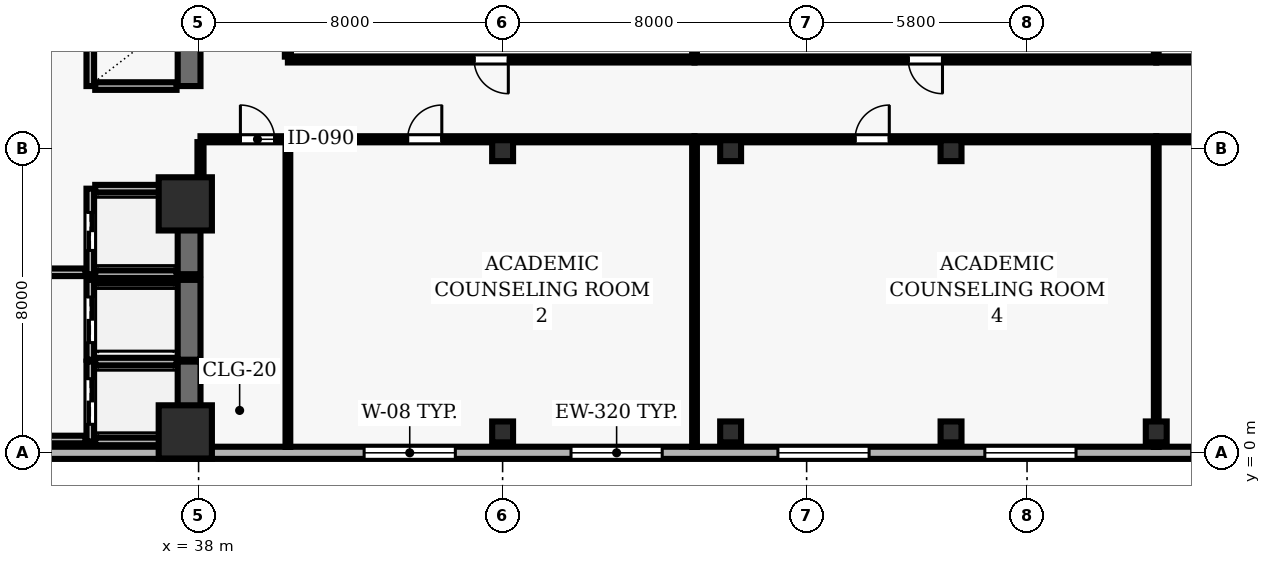
"""IFC4 building model, lengths in metres.
Left out: names, types, materials, properties, quantities, classifications, styles, units other than length and angle.
Written with IfcOpenShell. Run it as: python <this file> out.ifc"""

import sys

from ifc_helpers import new_model, si_unit, direction, frame, frame_2d, origin, origin_2d, place, context, subcontext, project, spatial, rectangle, hollow_rectangle, extrude, element, fill, save


model = new_model("IFC4")
c1 = context("Model", 3, precision=1e-05, world=origin(), true_north=direction((0.0, 1.0)))
c2 = subcontext(c1, "Body", "Model", "MODEL_VIEW")
j1 = project(units=[si_unit("LENGTHUNIT", "METRE"), si_unit("PLANEANGLEUNIT", "RADIAN")], contexts=[c1])
p1 = place(None, origin())
s1 = spatial("IfcSite", under=j1, at=p1, CompositionType="ELEMENT")
p2 = place(p1, origin())
s2 = spatial("IfcBuilding", under=s1, at=p2, CompositionType="ELEMENT")
p3 = place(p2, frame((0.0, 0.0, 81.7)))
s3 = spatial("IfcBuildingStorey", under=s2, at=p3, CompositionType="ELEMENT", Elevation=81.7)
for number, where, z_axis, x_axis in (
    (1, (37.65, 0.55, 0.0), (0.0, 0.0, 1.0), (1.0, 0.0, 0.0)),
    (2, (37.65, 6.55, 0.0), (0.0, 0.0, 1.0), (1.0, 0.0, 0.0)),
):
    element("IfcColumn", number, at=place(p3, frame(where, z_axis=z_axis, x_axis=x_axis)), inside=s3, PredefinedType="COLUMN", context=c2, shape_type="SweptSolid", body=[
        extrude(rectangle(XDim=1.4, YDim=1.4, at=origin_2d()), origin(), (0.0, 0.0, 1.0), 3.9),
    ])
for number, where, z_axis, x_axis in (
    (3, (46.0, 0.55, 0.0), (0.0, 0.0, 1.0), (1.0, 0.0, 0.0)),
    (4, (46.0, 7.95, 0.0), (0.0, 0.0, 1.0), (1.0, 0.0, 0.0)),
    (5, (52.0, 0.55, 0.0), (0.0, 0.0, 1.0), (1.0, 0.0, 0.0)),
    (6, (52.0, 7.95, 0.0), (0.0, 0.0, 1.0), (1.0, 0.0, 0.0)),
    (7, (57.8, 0.55, 0.0), (0.0, 0.0, 1.0), (1.0, 0.0, 0.0)),
    (8, (57.8, 7.95, 0.0), (0.0, 0.0, 1.0), (1.0, 0.0, 0.0)),
    (9, (63.2, 0.55, 0.0), (0.0, 0.0, 1.0), (1.0, 0.0, 0.0)),
):
    element("IfcColumn", number, at=place(p3, frame(where, z_axis=z_axis, x_axis=x_axis)), inside=s3, PredefinedType="COLUMN", context=c2, shape_type="SweptSolid", body=[
        extrude(hollow_rectangle(XDim=0.55, YDim=0.55, WallThickness=0.025, at=origin_2d()), origin(), (0.0, 0.0, 1.0), 3.9),
    ])
p4 = place(p3, frame((24.5, 0.0, 0.0), z_axis=(0.0, 0.0, 1.0), x_axis=(1.0, 0.0, 0.0)))
e10 = element("IfcWall", 10, at=p4, inside=s3, PredefinedType="SOLIDWALL", context=c2, shape_type="SweptSolid", body=[
    extrude(rectangle(XDim=49.0, YDim=0.32, at=frame_2d((24.5, 0.0))), origin(), (0.0, 0.0, 1.0), 3.69),
])
p5 = place(p4, frame((1.522, 0.0, 0.9)))
e11 = element("IfcOpeningElement", 11, at=p5, cuts=e10, PredefinedType="OPENING", context=c2, shape_type="SweptSolid", body=[
    extrude(rectangle(XDim=2.4, YDim=1.8, at=frame_2d((1.2, 0.9))), frame((0.0, 0.17, 0.0), z_axis=(0.0, -1.0, 0.0), x_axis=(1.0, 0.0, 0.0)), (0.0, 0.0, 1.0), 0.34),
])
p6 = place(p4, frame((17.856, 0.0, 0.9)))
e12 = element("IfcOpeningElement", 12, at=p6, cuts=e10, PredefinedType="OPENING", context=c2, shape_type="SweptSolid", body=[
    extrude(rectangle(XDim=2.4, YDim=1.8, at=frame_2d((1.2, 0.9))), frame((0.0, 0.17, 0.0), z_axis=(0.0, -1.0, 0.0), x_axis=(1.0, 0.0, 0.0)), (0.0, 0.0, 1.0), 0.34),
])
p7 = place(p4, frame((23.3, 0.0, 0.9)))
e13 = element("IfcOpeningElement", 13, at=p7, cuts=e10, PredefinedType="OPENING", context=c2, shape_type="SweptSolid", body=[
    extrude(rectangle(XDim=2.4, YDim=1.8, at=frame_2d((1.2, 0.9))), frame((0.0, 0.17, 0.0), z_axis=(0.0, -1.0, 0.0), x_axis=(1.0, 0.0, 0.0)), (0.0, 0.0, 1.0), 0.34),
])
p8 = place(p4, frame((28.744, 0.0, 0.9)))
e14 = element("IfcOpeningElement", 14, at=p8, cuts=e10, PredefinedType="OPENING", context=c2, shape_type="SweptSolid", body=[
    extrude(rectangle(XDim=2.4, YDim=1.8, at=frame_2d((1.2, 0.9))), frame((0.0, 0.17, 0.0), z_axis=(0.0, -1.0, 0.0), x_axis=(1.0, 0.0, 0.0)), (0.0, 0.0, 1.0), 0.34),
])
p9 = place(p4, frame((34.189, 0.0, 0.9)))
e15 = element("IfcOpeningElement", 15, at=p9, cuts=e10, PredefinedType="OPENING", context=c2, shape_type="SweptSolid", body=[
    extrude(rectangle(XDim=2.4, YDim=1.8, at=frame_2d((1.2, 0.9))), frame((0.0, 0.17, 0.0), z_axis=(0.0, -1.0, 0.0), x_axis=(1.0, 0.0, 0.0)), (0.0, 0.0, 1.0), 0.34),
])
p10 = place(p4, frame((39.633, 0.0, 0.9)))
e16 = element("IfcOpeningElement", 16, at=p10, cuts=e10, PredefinedType="OPENING", context=c2, shape_type="SweptSolid", body=[
    extrude(rectangle(XDim=2.4, YDim=1.8, at=frame_2d((1.2, 0.9))), frame((0.0, 0.17, 0.0), z_axis=(0.0, -1.0, 0.0), x_axis=(1.0, 0.0, 0.0)), (0.0, 0.0, 1.0), 0.34),
])
p11 = place(p4, frame((45.078, 0.0, 0.9)))
e17 = element("IfcOpeningElement", 17, at=p11, cuts=e10, PredefinedType="OPENING", context=c2, shape_type="SweptSolid", body=[
    extrude(rectangle(XDim=2.4, YDim=1.8, at=frame_2d((1.2, 0.9))), frame((0.0, 0.17, 0.0), z_axis=(0.0, -1.0, 0.0), x_axis=(1.0, 0.0, 0.0)), (0.0, 0.0, 1.0), 0.34),
])
p12 = place(p3, frame((35.15, 2.4, 0.0), z_axis=(0.0, 0.0, 1.0), x_axis=(0.0, -1.0, 0.0)))
e18 = element("IfcWall", 18, at=p12, inside=s3, PredefinedType="SOLIDWALL", context=c2, shape_type="SweptSolid", body=[
    extrude(rectangle(XDim=2.1, YDim=0.2, at=frame_2d((1.05, 0.0))), origin(), (0.0, 0.0, 1.0), 3.69),
])
p13 = place(p12, frame((0.45, 0.0, 0.0)))
e19 = element("IfcOpeningElement", 19, at=p13, cuts=e18, PredefinedType="OPENING", context=c2, shape_type="SweptSolid", body=[
    extrude(rectangle(XDim=1.2, YDim=2.15, at=frame_2d((0.6, 1.075))), frame((0.0, 0.11, 0.0), z_axis=(0.0, -1.0, 0.0), x_axis=(1.0, 0.0, 0.0)), (0.0, 0.0, 1.0), 0.22),
])
p14 = place(p3, frame((37.75, 0.3, 0.0), z_axis=(0.0, 0.0, 1.0), x_axis=(0.0, 1.0, 0.0)))
e20 = element("IfcWall", 20, at=p14, inside=s3, PredefinedType="SHEAR", context=c2, shape_type="SweptSolid", body=[
    extrude(rectangle(XDim=2.1, YDim=0.6, at=frame_2d((1.05, 0.0))), origin(), (0.0, 0.0, 1.0), 3.69),
])
for number, where, z_axis, x_axis in (
    (21, (35.28, 0.3, 0.0), (0.0, 0.0, 1.0), (1.0, 0.0, 0.0)),
    (22, (37.42, 2.4, 0.0), (0.0, 0.0, 1.0), (-1.0, 0.0, 0.0)),
):
    element("IfcWall", number, at=place(p3, frame(where, z_axis=z_axis, x_axis=x_axis)), inside=s3, PredefinedType="SOLIDWALL", context=c2, shape_type="SweptSolid", body=[
        extrude(rectangle(XDim=2.14, YDim=0.2, at=frame_2d((1.07, 0.0))), origin(), (0.0, 0.0, 1.0), 3.69),
    ])
p15 = place(p3, frame((35.15, 4.55, 0.0), z_axis=(0.0, 0.0, 1.0), x_axis=(0.0, -1.0, 0.0)))
e23 = element("IfcWall", 23, at=p15, inside=s3, PredefinedType="SOLIDWALL", context=c2, shape_type="SweptSolid", body=[
    extrude(rectangle(XDim=2.1, YDim=0.2, at=frame_2d((1.05, 0.0))), origin(), (0.0, 0.0, 1.0), 3.69),
])
p16 = place(p15, frame((0.45, 0.0, 0.0)))
e24 = element("IfcOpeningElement", 24, at=p16, cuts=e23, PredefinedType="OPENING", context=c2, shape_type="SweptSolid", body=[
    extrude(rectangle(XDim=1.2, YDim=2.15, at=frame_2d((0.6, 1.075))), frame((0.0, 0.11, 0.0), z_axis=(0.0, -1.0, 0.0), x_axis=(1.0, 0.0, 0.0)), (0.0, 0.0, 1.0), 0.22),
])
p17 = place(p3, frame((37.75, 2.45, 0.0), z_axis=(0.0, 0.0, 1.0), x_axis=(0.0, 1.0, 0.0)))
e25 = element("IfcWall", 25, at=p17, inside=s3, PredefinedType="SHEAR", context=c2, shape_type="SweptSolid", body=[
    extrude(rectangle(XDim=2.1, YDim=0.6, at=frame_2d((1.05, 0.0))), origin(), (0.0, 0.0, 1.0), 3.69),
])
p18 = place(p3, frame((37.42, 4.55, 0.0), z_axis=(0.0, 0.0, 1.0), x_axis=(-1.0, 0.0, 0.0)))
e26 = element("IfcWall", 26, at=p18, inside=s3, PredefinedType="SOLIDWALL", context=c2, shape_type="SweptSolid", body=[
    extrude(rectangle(XDim=2.14, YDim=0.2, at=frame_2d((1.07, 0.0))), origin(), (0.0, 0.0, 1.0), 3.69),
])
p19 = place(p3, frame((35.15, 6.95, 0.0), z_axis=(0.0, 0.0, 1.0), x_axis=(0.0, -1.0, 0.0)))
e27 = element("IfcWall", 27, at=p19, inside=s3, PredefinedType="SOLIDWALL", context=c2, shape_type="SweptSolid", body=[
    extrude(rectangle(XDim=2.25, YDim=0.2, at=frame_2d((1.125, 0.0))), origin(), (0.0, 0.0, 1.0), 3.69),
])
p20 = place(p19, frame((0.625, 0.0, 0.0)))
e28 = element("IfcOpeningElement", 28, at=p20, cuts=e27, PredefinedType="OPENING", context=c2, shape_type="SweptSolid", body=[
    extrude(rectangle(XDim=1.0, YDim=2.1, at=frame_2d((0.5, 1.05))), frame((0.0, 0.11, 0.0), z_axis=(0.0, -1.0, 0.0), x_axis=(1.0, 0.0, 0.0)), (0.0, 0.0, 1.0), 0.22),
])
p21 = place(p3, frame((37.75, 4.7, 0.0), z_axis=(0.0, 0.0, 1.0), x_axis=(0.0, 1.0, 0.0)))
e29 = element("IfcWall", 29, at=p21, inside=s3, PredefinedType="SHEAR", context=c2, shape_type="SweptSolid", body=[
    extrude(rectangle(XDim=2.25, YDim=0.6, at=frame_2d((1.125, 0.0))), origin(), (0.0, 0.0, 1.0), 3.69),
])
for number, where, z_axis, x_axis in (
    (30, (35.28, 4.7, 0.0), (0.0, 0.0, 1.0), (1.0, 0.0, 0.0)),
    (31, (37.42, 6.95, 0.0), (0.0, 0.0, 1.0), (-1.0, 0.0, 0.0)),
):
    element("IfcWall", number, at=place(p3, frame(where, z_axis=z_axis, x_axis=x_axis)), inside=s3, PredefinedType="SOLIDWALL", context=c2, shape_type="SweptSolid", body=[
        extrude(rectangle(XDim=2.14, YDim=0.2, at=frame_2d((1.07, 0.0))), origin(), (0.0, 0.0, 1.0), 3.69),
    ])
p22 = place(p3, frame((35.15, 11.55, 0.0), z_axis=(0.0, 0.0, 1.0), x_axis=(0.0, -1.0, 0.0)))
e32 = element("IfcWall", 32, at=p22, inside=s3, PredefinedType="SOLIDWALL", context=c2, shape_type="SweptSolid", body=[
    extrude(rectangle(XDim=1.9, YDim=0.2, at=frame_2d((0.95, 0.0))), origin(), (0.0, 0.0, 1.0), 3.69),
])
p23 = place(p3, frame((37.75, 9.65, 0.0), z_axis=(0.0, 0.0, 1.0), x_axis=(0.0, 1.0, 0.0)))
e33 = element("IfcWall", 33, at=p23, inside=s3, PredefinedType="SHEAR", context=c2, shape_type="SweptSolid", body=[
    extrude(rectangle(XDim=1.9, YDim=0.6, at=frame_2d((0.95, 0.0))), origin(), (0.0, 0.0, 1.0), 3.69),
])
p24 = place(p3, frame((35.28, 9.65, 0.0), z_axis=(0.0, 0.0, 1.0), x_axis=(1.0, 0.0, 0.0)))
e34 = element("IfcWall", 34, at=p24, inside=s3, PredefinedType="SOLIDWALL", context=c2, shape_type="SweptSolid", body=[
    extrude(rectangle(XDim=2.14, YDim=0.2, at=frame_2d((1.07, 0.0))), origin(), (0.0, 0.0, 1.0), 3.69),
])
p25 = place(p3, frame((31.65, 0.35, 0.0), z_axis=(0.0, 0.0, 1.0), x_axis=(1.0, 0.0, 0.0)))
e35 = element("IfcWall", 35, at=p25, inside=s3, PredefinedType="SOLIDWALL", context=c2, shape_type="SweptSolid", body=[
    extrude(rectangle(XDim=3.37, YDim=0.2, at=frame_2d((1.685, 0.0))), origin(), (0.0, 0.0, 1.0), 3.69),
])
p26 = place(p3, frame((35.02, 4.75, 0.0), z_axis=(0.0, 0.0, 1.0), x_axis=(-1.0, 0.0, 0.0)))
e36 = element("IfcWall", 36, at=p26, inside=s3, PredefinedType="SOLIDWALL", context=c2, shape_type="SweptSolid", body=[
    extrude(rectangle(XDim=3.11, YDim=0.2, at=frame_2d((1.555, 0.0))), origin(), (0.0, 0.0, 1.0), 3.69),
])
p27 = place(p26, frame((1.03, 0.0, 0.0)))
e37 = element("IfcOpeningElement", 37, at=p27, cuts=e36, PredefinedType="OPENING", context=c2, shape_type="SweptSolid", body=[
    extrude(rectangle(XDim=1.05, YDim=2.15, at=frame_2d((0.525, 1.075))), frame((0.0, 0.11, 0.0), z_axis=(0.0, -1.0, 0.0), x_axis=(1.0, 0.0, 0.0)), (0.0, 0.0, 1.0), 0.22),
])
p28 = place(p3, frame((38.05, 8.25, 0.0), z_axis=(0.0, 0.0, 1.0), x_axis=(1.0, 0.0, 0.0)))
e38 = element("IfcWall", 38, at=p28, inside=s3, PredefinedType="PARTITIONING", context=c2, shape_type="SweptSolid", body=[
    extrude(rectangle(XDim=2.3, YDim=0.16, at=frame_2d((1.15, 0.0))), origin(), (0.0, 0.0, 1.0), 3.055),
])
p29 = place(p28, frame((1.05, 0.0, 0.0)))
e39 = element("IfcOpeningElement", 39, at=p29, cuts=e38, PredefinedType="OPENING", context=c2, shape_type="SweptSolid", body=[
    extrude(rectangle(XDim=0.9, YDim=2.1, at=frame_2d((0.45, 1.05))), frame((0.0, 0.09, 0.0), z_axis=(0.0, -1.0, 0.0), x_axis=(1.0, 0.0, 0.0)), (0.0, 0.0, 1.0), 0.18),
])
p30 = place(p3, frame((40.35, 8.25, 0.0), z_axis=(0.0, 0.0, 1.0), x_axis=(1.0, 0.0, 0.0)))
e40 = element("IfcWall", 40, at=p30, inside=s3, PredefinedType="PARTITIONING", context=c2, shape_type="SweptSolid", body=[
    extrude(rectangle(XDim=10.7, YDim=0.16, at=frame_2d((5.35, 0.0))), origin(), (0.0, 0.0, 1.0), 3.055),
])
p31 = place(p30, frame((3.15, 0.0, 0.0)))
e41 = element("IfcOpeningElement", 41, at=p31, cuts=e40, PredefinedType="OPENING", context=c2, shape_type="SweptSolid", body=[
    extrude(rectangle(XDim=0.9, YDim=2.1, at=frame_2d((0.45, 1.05))), frame((0.0, 0.09, 0.0), z_axis=(0.0, -1.0, 0.0), x_axis=(1.0, 0.0, 0.0)), (0.0, 0.0, 1.0), 0.18),
])
p32 = place(p3, frame((51.05, 8.25, 0.0), z_axis=(0.0, 0.0, 1.0), x_axis=(1.0, 0.0, 0.0)))
e42 = element("IfcWall", 42, at=p32, inside=s3, PredefinedType="PARTITIONING", context=c2, shape_type="SweptSolid", body=[
    extrude(rectangle(XDim=12.15, YDim=0.16, at=frame_2d((6.075, 0.0))), origin(), (0.0, 0.0, 1.0), 3.055),
])
p33 = place(p32, frame((4.225, 0.0, 0.0)))
e43 = element("IfcOpeningElement", 43, at=p33, cuts=e42, PredefinedType="OPENING", context=c2, shape_type="SweptSolid", body=[
    extrude(rectangle(XDim=0.9, YDim=2.1, at=frame_2d((0.45, 1.05))), frame((0.0, 0.09, 0.0), z_axis=(0.0, -1.0, 0.0), x_axis=(1.0, 0.0, 0.0)), (0.0, 0.0, 1.0), 0.18),
])
p34 = place(p3, frame((51.05, 10.35, 0.0), z_axis=(0.0, 0.0, 1.0), x_axis=(-1.0, 0.0, 0.0)))
e44 = element("IfcWall", 44, at=p34, inside=s3, PredefinedType="PARTITIONING", context=c2, shape_type="SweptSolid", body=[
    extrude(rectangle(XDim=10.7, YDim=0.16, at=frame_2d((5.35, 0.0))), origin(), (0.0, 0.0, 1.0), 3.277),
])
p35 = place(p34, frame((4.9, 0.0, 0.0)))
e45 = element("IfcOpeningElement", 45, at=p35, cuts=e44, PredefinedType="OPENING", context=c2, shape_type="SweptSolid", body=[
    extrude(rectangle(XDim=0.9, YDim=2.1, at=frame_2d((0.45, 1.05))), frame((0.0, 0.09, 0.0), z_axis=(0.0, -1.0, 0.0), x_axis=(1.0, 0.0, 0.0)), (0.0, 0.0, 1.0), 0.18),
])
p36 = place(p3, frame((63.2, 8.25, 0.0), z_axis=(0.0, 0.0, 1.0), x_axis=(1.0, 0.0, 0.0)))
e46 = element("IfcWall", 46, at=p36, inside=s3, PredefinedType="PARTITIONING", context=c2, shape_type="SweptSolid", body=[
    extrude(rectangle(XDim=12.645, YDim=0.16, at=frame_2d((6.323, 0.0))), origin(), (0.0, 0.0, 1.0), 3.69),
])
p37 = place(p36, frame((5.872, 0.0, 0.0)))
e47 = element("IfcOpeningElement", 47, at=p37, cuts=e46, PredefinedType="OPENING", context=c2, shape_type="SweptSolid", body=[
    extrude(rectangle(XDim=0.9, YDim=2.1, at=frame_2d((0.45, 1.05))), frame((0.0, 0.09, 0.0), z_axis=(0.0, -1.0, 0.0), x_axis=(1.0, 0.0, 0.0)), (0.0, 0.0, 1.0), 0.18),
])
p38 = place(p3, frame((63.2, 10.35, 0.0), z_axis=(0.0, 0.0, 1.0), x_axis=(-1.0, 0.0, 0.0)))
e48 = element("IfcWall", 48, at=p38, inside=s3, PredefinedType="PARTITIONING", context=c2, shape_type="SweptSolid", body=[
    extrude(rectangle(XDim=12.15, YDim=0.16, at=frame_2d((6.075, 0.0))), origin(), (0.0, 0.0, 1.0), 3.277),
])
p39 = place(p38, frame((5.625, 0.0, 0.0)))
e49 = element("IfcOpeningElement", 49, at=p39, cuts=e48, PredefinedType="OPENING", context=c2, shape_type="SweptSolid", body=[
    extrude(rectangle(XDim=0.9, YDim=2.1, at=frame_2d((0.45, 1.05))), frame((0.0, 0.09, 0.0), z_axis=(0.0, -1.0, 0.0), x_axis=(1.0, 0.0, 0.0)), (0.0, 0.0, 1.0), 0.18),
])
p40 = place(p3, frame((75.845, 10.35, 0.0), z_axis=(0.0, 0.0, 1.0), x_axis=(-1.0, 0.0, 0.0)))
e50 = element("IfcWall", 50, at=p40, inside=s3, PredefinedType="PARTITIONING", context=c2, shape_type="SweptSolid", body=[
    extrude(rectangle(XDim=12.645, YDim=0.16, at=frame_2d((6.323, 0.0))), origin(), (0.0, 0.0, 1.0), 3.277),
])
p41 = place(p40, frame((5.872, 0.0, 0.0)))
e51 = element("IfcOpeningElement", 51, at=p41, cuts=e50, PredefinedType="OPENING", context=c2, shape_type="SweptSolid", body=[
    extrude(rectangle(XDim=0.9, YDim=2.1, at=frame_2d((0.45, 1.05))), frame((0.0, 0.09, 0.0), z_axis=(0.0, -1.0, 0.0), x_axis=(1.0, 0.0, 0.0)), (0.0, 0.0, 1.0), 0.18),
])
p42 = place(p3, frame((38.05, 7.05, 0.0), z_axis=(0.0, 0.0, 1.0), x_axis=(0.0, 1.0, 0.0)))
e52 = element("IfcWall", 52, at=p42, inside=s3, PredefinedType="PARTITIONING", context=c2, shape_type="SweptSolid", body=[
    extrude(rectangle(XDim=1.125, YDim=0.16, at=frame_2d((0.562, 0.0))), origin(), (0.0, 0.0, 1.0), 3.055),
])
p43 = place(p3, frame((40.35, 0.155, 0.0), z_axis=(0.0, 0.0, 1.0), x_axis=(0.0, 1.0, 0.0)))
e53 = element("IfcWall", 53, at=p43, inside=s3, PredefinedType="PARTITIONING", context=c2, shape_type="SweptSolid", body=[
    extrude(rectangle(XDim=8.02, YDim=0.125, at=frame_2d((4.01, 0.0))), origin(), (0.0, 0.0, 1.0), 3.69),
])
p44 = place(p3, frame((40.35, 10.425, 0.0), z_axis=(0.0, 0.0, 1.0), x_axis=(0.0, 1.0, 0.0)))
e54 = element("IfcWall", 54, at=p44, inside=s3, PredefinedType="PARTITIONING", context=c2, shape_type="SweptSolid", body=[
    extrude(rectangle(XDim=5.5, YDim=0.16, at=frame_2d((2.75, 0.0))), origin(), (0.0, 0.0, 1.0), 3.277),
])
p45 = place(p3, frame((51.05, 0.155, 0.0), z_axis=(0.0, 0.0, 1.0), x_axis=(0.0, 1.0, 0.0)))
e55 = element("IfcWall", 55, at=p45, inside=s3, PredefinedType="PARTITIONING", context=c2, shape_type="SweptSolid", body=[
    extrude(rectangle(XDim=8.02, YDim=0.125, at=frame_2d((4.01, 0.0))), origin(), (0.0, 0.0, 1.0), 3.69),
])
p46 = place(p3, frame((51.05, 10.425, 0.0), z_axis=(0.0, 0.0, 1.0), x_axis=(0.0, 1.0, 0.0)))
e56 = element("IfcWall", 56, at=p46, inside=s3, PredefinedType="PARTITIONING", context=c2, shape_type="SweptSolid", body=[
    extrude(rectangle(XDim=5.42, YDim=0.125, at=frame_2d((2.71, 0.0))), origin(), (0.0, 0.0, 1.0), 3.69),
])
p47 = place(p3, frame((63.2, 0.155, 0.0), z_axis=(0.0, 0.0, 1.0), x_axis=(0.0, 1.0, 0.0)))
e57 = element("IfcWall", 57, at=p47, inside=s3, PredefinedType="PARTITIONING", context=c2, shape_type="SweptSolid", body=[
    extrude(rectangle(XDim=8.02, YDim=0.125, at=frame_2d((4.01, 0.0))), origin(), (0.0, 0.0, 1.0), 3.055),
])
p48 = place(p3, frame((63.2, 10.425, 0.0), z_axis=(0.0, 0.0, 1.0), x_axis=(0.0, 1.0, 0.0)))
e58 = element("IfcWall", 58, at=p48, inside=s3, PredefinedType="PARTITIONING", context=c2, shape_type="SweptSolid", body=[
    extrude(rectangle(XDim=5.42, YDim=0.125, at=frame_2d((2.71, 0.0))), origin(), (0.0, 0.0, 1.0), 3.055),
])
p49 = place(p6, origin())
e59 = element("IfcWindow", 59, at=p49, inside=s3, PartitioningType="SINGLE_PANEL", PredefinedType="WINDOW", context=c2, shape_type="SweptSolid", body=[
    extrude(rectangle(XDim=2.4, YDim=1.8, at=frame_2d((1.2, 0.9))), frame((0.0, 0.03, 0.0), z_axis=(0.0, -1.0, 0.0), x_axis=(1.0, 0.0, 0.0)), (0.0, 0.0, 1.0), 0.06),
])
fill(e12, e59)
p50 = place(p7, origin())
e60 = element("IfcWindow", 60, at=p50, inside=s3, PartitioningType="SINGLE_PANEL", PredefinedType="WINDOW", context=c2, shape_type="SweptSolid", body=[
    extrude(rectangle(XDim=2.4, YDim=1.8, at=frame_2d((1.2, 0.9))), frame((0.0, 0.03, 0.0), z_axis=(0.0, -1.0, 0.0), x_axis=(1.0, 0.0, 0.0)), (0.0, 0.0, 1.0), 0.06),
])
fill(e13, e60)
p51 = place(p8, origin())
e61 = element("IfcWindow", 61, at=p51, inside=s3, PartitioningType="SINGLE_PANEL", PredefinedType="WINDOW", context=c2, shape_type="SweptSolid", body=[
    extrude(rectangle(XDim=2.4, YDim=1.8, at=frame_2d((1.2, 0.9))), frame((0.0, 0.03, 0.0), z_axis=(0.0, -1.0, 0.0), x_axis=(1.0, 0.0, 0.0)), (0.0, 0.0, 1.0), 0.06),
])
fill(e14, e61)
p52 = place(p9, origin())
e62 = element("IfcWindow", 62, at=p52, inside=s3, PartitioningType="SINGLE_PANEL", PredefinedType="WINDOW", context=c2, shape_type="SweptSolid", body=[
    extrude(rectangle(XDim=2.4, YDim=1.8, at=frame_2d((1.2, 0.9))), frame((0.0, 0.03, 0.0), z_axis=(0.0, -1.0, 0.0), x_axis=(1.0, 0.0, 0.0)), (0.0, 0.0, 1.0), 0.06),
])
fill(e15, e62)
p53 = place(p13, origin())
e63 = element("IfcDoor", 63, at=p53, inside=s3, OperationType="DOUBLE_DOOR_SLIDING", PredefinedType="DOOR", context=c2, shape_type="SweptSolid", body=[
    extrude(rectangle(XDim=1.2, YDim=2.15, at=frame_2d((0.6, 1.075))), frame((0.0, 0.025, 0.0), z_axis=(0.0, -1.0, 0.0), x_axis=(1.0, 0.0, 0.0)), (0.0, 0.0, 1.0), 0.05),
])
fill(e19, e63)
p54 = place(p16, origin())
e64 = element("IfcDoor", 64, at=p54, inside=s3, OperationType="DOUBLE_DOOR_SLIDING", PredefinedType="DOOR", context=c2, shape_type="SweptSolid", body=[
    extrude(rectangle(XDim=1.2, YDim=2.15, at=frame_2d((0.6, 1.075))), frame((0.0, 0.025, 0.0), z_axis=(0.0, -1.0, 0.0), x_axis=(1.0, 0.0, 0.0)), (0.0, 0.0, 1.0), 0.05),
])
fill(e24, e64)
p55 = place(p20, origin())
e65 = element("IfcDoor", 65, at=p55, inside=s3, OperationType="DOUBLE_DOOR_SLIDING", PredefinedType="DOOR", context=c2, shape_type="SweptSolid", body=[
    extrude(rectangle(XDim=1.0, YDim=2.1, at=frame_2d((0.5, 1.05))), frame((0.0, 0.025, 0.0), z_axis=(0.0, -1.0, 0.0), x_axis=(1.0, 0.0, 0.0)), (0.0, 0.0, 1.0), 0.05),
])
fill(e28, e65)
p56 = place(p29, origin())
e66 = element("IfcDoor", 66, at=p56, inside=s3, OperationType="SINGLE_SWING_LEFT", PredefinedType="DOOR", context=c2, shape_type="SweptSolid", body=[
    extrude(rectangle(XDim=0.9, YDim=2.1, at=frame_2d((0.45, 1.05))), frame((0.0, 0.025, 0.0), z_axis=(0.0, -1.0, 0.0), x_axis=(1.0, 0.0, 0.0)), (0.0, 0.0, 1.0), 0.05),
])
fill(e39, e66)
p57 = place(p31, origin())
e67 = element("IfcDoor", 67, at=p57, inside=s3, OperationType="SINGLE_SWING_RIGHT", PredefinedType="DOOR", context=c2, shape_type="SweptSolid", body=[
    extrude(rectangle(XDim=0.9, YDim=2.1, at=frame_2d((0.45, 1.05))), frame((0.0, 0.025, 0.0), z_axis=(0.0, -1.0, 0.0), x_axis=(1.0, 0.0, 0.0)), (0.0, 0.0, 1.0), 0.05),
])
fill(e41, e67)
p58 = place(p35, origin())
e68 = element("IfcDoor", 68, at=p58, inside=s3, OperationType="SINGLE_SWING_LEFT", PredefinedType="DOOR", context=c2, shape_type="SweptSolid", body=[
    extrude(rectangle(XDim=0.9, YDim=2.1, at=frame_2d((0.45, 1.05))), frame((0.0, 0.025, 0.0), z_axis=(0.0, -1.0, 0.0), x_axis=(1.0, 0.0, 0.0)), (0.0, 0.0, 1.0), 0.05),
])
fill(e45, e68)
p59 = place(p33, origin())
e69 = element("IfcDoor", 69, at=p59, inside=s3, OperationType="SINGLE_SWING_RIGHT", PredefinedType="DOOR", context=c2, shape_type="SweptSolid", body=[
    extrude(rectangle(XDim=0.9, YDim=2.1, at=frame_2d((0.45, 1.05))), frame((0.0, 0.025, 0.0), z_axis=(0.0, -1.0, 0.0), x_axis=(1.0, 0.0, 0.0)), (0.0, 0.0, 1.0), 0.05),
])
fill(e43, e69)
p60 = place(p39, origin())
e70 = element("IfcDoor", 70, at=p60, inside=s3, OperationType="SINGLE_SWING_LEFT", PredefinedType="DOOR", context=c2, shape_type="SweptSolid", body=[
    extrude(rectangle(XDim=0.9, YDim=2.1, at=frame_2d((0.45, 1.05))), frame((0.0, 0.025, 0.0), z_axis=(0.0, -1.0, 0.0), x_axis=(1.0, 0.0, 0.0)), (0.0, 0.0, 1.0), 0.05),
])
fill(e49, e70)
save(model, sys.argv[1])
